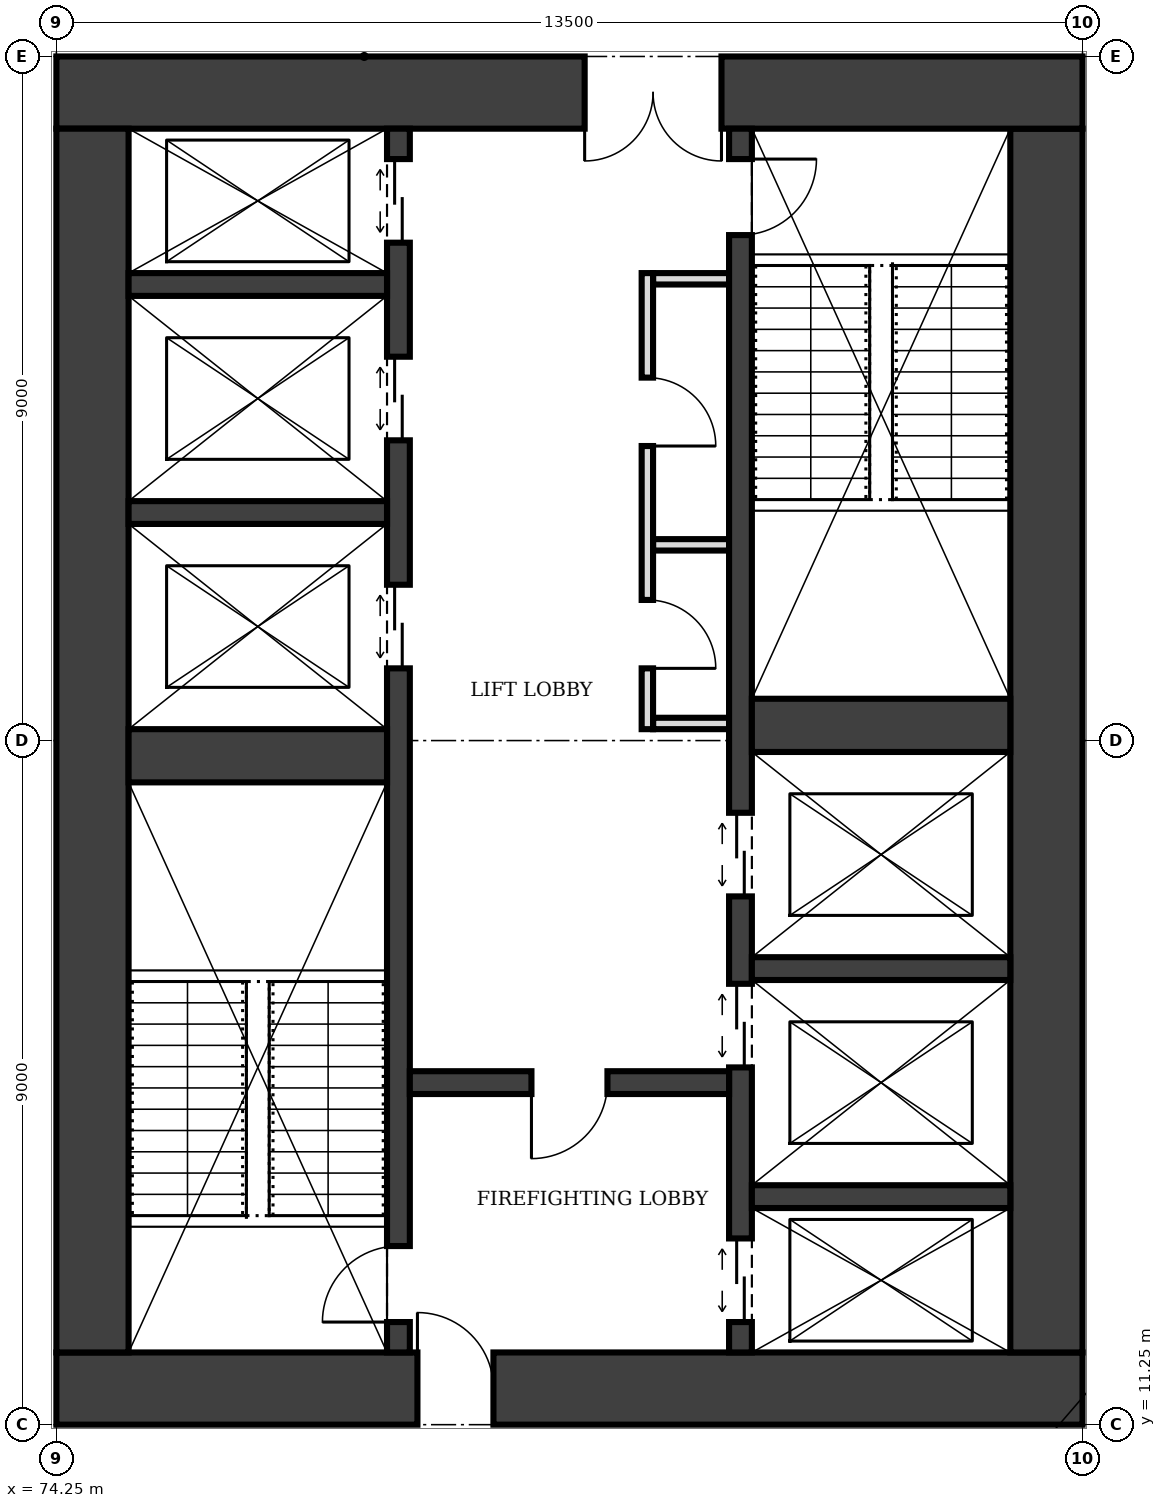
"""IFC4 building model, lengths in metres.
Left out: names, types, materials, properties, quantities, classifications, styles, units other than length and angle.
Written with IfcOpenShell. Run it as: python <this file> out.ifc"""

import sys

from ifc_helpers import new_model, si_unit, direction, frame, frame_2d, origin, place, context, subcontext, project, spatial, rectangle, extrude, element, fill, save


model = new_model("IFC4")
c1 = context("Model", 3, precision=1e-05, world=origin(), true_north=direction((0.0, 1.0)))
c2 = subcontext(c1, "Body", "Model", "MODEL_VIEW")
j1 = project(units=[si_unit("LENGTHUNIT", "METRE"), si_unit("PLANEANGLEUNIT", "RADIAN")], contexts=[c1])
p1 = place(None, origin())
s1 = spatial("IfcSite", under=j1, at=p1, CompositionType="ELEMENT")
p2 = place(p1, origin())
s2 = spatial("IfcBuilding", under=s1, at=p2, CompositionType="ELEMENT")
p3 = place(p2, frame((0.0, 0.0, 105.0)))
s3 = spatial("IfcBuildingStorey", under=s2, at=p3, CompositionType="ELEMENT", Elevation=105.0)
p4 = place(p3, frame((74.25, 11.725, 0.0), z_axis=(0.0, 0.0, 1.0), x_axis=(1.0, 0.0, 0.0)))
e1 = element("IfcWall", 1, at=p4, inside=s3, PredefinedType="SHEAR", context=c2, shape_type="SweptSolid", body=[
    extrude(rectangle(XDim=13.5, YDim=0.95, at=frame_2d((6.75, 0.0))), origin(), (0.0, 0.0, 1.0), 4.0),
])
p5 = place(p4, frame((4.75, 0.0, 0.0)))
e2 = element("IfcOpeningElement", 2, at=p5, cuts=e1, PredefinedType="OPENING", context=c2, shape_type="SweptSolid", body=[
    extrude(rectangle(XDim=1.0, YDim=2.1, at=frame_2d((0.5, 1.05))), frame((0.0, 0.485, 0.0), z_axis=(0.0, -1.0, 0.0), x_axis=(1.0, 0.0, 0.0)), (0.0, 0.0, 1.0), 0.97),
])
p6 = place(p3, frame((87.275, 12.2, 0.0), z_axis=(0.0, 0.0, 1.0), x_axis=(0.0, 1.0, 0.0)))
e3 = element("IfcWall", 3, at=p6, inside=s3, PredefinedType="SHEAR", context=c2, shape_type="SweptSolid", body=[
    extrude(rectangle(XDim=16.1, YDim=0.95, at=frame_2d((8.05, 0.0))), origin(), (0.0, 0.0, 1.0), 4.0),
])
p7 = place(p3, frame((87.75, 28.775, 0.0), z_axis=(0.0, 0.0, 1.0), x_axis=(-1.0, 0.0, 0.0)))
e4 = element("IfcWall", 4, at=p7, inside=s3, PredefinedType="SHEAR", context=c2, shape_type="SweptSolid", body=[
    extrude(rectangle(XDim=13.5, YDim=0.95, at=frame_2d((6.75, 0.0))), origin(), (0.0, 0.0, 1.0), 4.0),
])
p8 = place(p7, frame((4.75, 0.0, 0.0)))
e5 = element("IfcOpeningElement", 5, at=p8, cuts=e4, PredefinedType="OPENING", context=c2, shape_type="SweptSolid", body=[
    extrude(rectangle(XDim=1.8, YDim=2.1, at=frame_2d((0.9, 1.05))), frame((0.0, 0.485, 0.0), z_axis=(0.0, -1.0, 0.0), x_axis=(1.0, 0.0, 0.0)), (0.0, 0.0, 1.0), 0.97),
])
p9 = place(p3, frame((74.725, 28.3, 0.0), z_axis=(0.0, 0.0, 1.0), x_axis=(0.0, -1.0, 0.0)))
e6 = element("IfcWall", 6, at=p9, inside=s3, PredefinedType="SHEAR", context=c2, shape_type="SweptSolid", body=[
    extrude(rectangle(XDim=16.1, YDim=0.95, at=frame_2d((8.05, 0.0))), origin(), (0.0, 0.0, 1.0), 4.0),
])
p10 = place(p3, frame((78.75, 12.2, 0.0), z_axis=(0.0, 0.0, 1.0), x_axis=(0.0, 1.0, 0.0)))
e7 = element("IfcWall", 7, at=p10, inside=s3, PredefinedType="SHEAR", context=c2, shape_type="SweptSolid", body=[
    extrude(rectangle(XDim=16.1, YDim=0.3, at=frame_2d((8.05, 0.0))), origin(), (0.0, 0.0, 1.0), 4.0),
])
p11 = place(p10, frame((0.4, 0.0, 0.0)))
e8 = element("IfcOpeningElement", 8, at=p11, cuts=e7, PredefinedType="OPENING", context=c2, shape_type="SweptSolid", body=[
    extrude(rectangle(XDim=1.0, YDim=2.1, at=frame_2d((0.5, 1.05))), frame((0.0, 0.16, 0.0), z_axis=(0.0, -1.0, 0.0), x_axis=(1.0, 0.0, 0.0)), (0.0, 0.0, 1.0), 0.32),
])
p12 = place(p10, frame((9.0, 0.0, 0.0)))
e9 = element("IfcOpeningElement", 9, at=p12, cuts=e7, PredefinedType="OPENING", context=c2, shape_type="SweptSolid", body=[
    extrude(rectangle(XDim=1.1, YDim=2.1, at=frame_2d((0.55, 1.05))), frame((0.0, 0.16, 0.0), z_axis=(0.0, -1.0, 0.0), x_axis=(1.0, 0.0, 0.0)), (0.0, 0.0, 1.0), 0.32),
])
p13 = place(p10, frame((12.0, 0.0, 0.0)))
e10 = element("IfcOpeningElement", 10, at=p13, cuts=e7, PredefinedType="OPENING", context=c2, shape_type="SweptSolid", body=[
    extrude(rectangle(XDim=1.1, YDim=2.1, at=frame_2d((0.55, 1.05))), frame((0.0, 0.16, 0.0), z_axis=(0.0, -1.0, 0.0), x_axis=(1.0, 0.0, 0.0)), (0.0, 0.0, 1.0), 0.32),
])
p14 = place(p10, frame((14.6, 0.0, 0.0)))
e11 = element("IfcOpeningElement", 11, at=p14, cuts=e7, PredefinedType="OPENING", context=c2, shape_type="SweptSolid", body=[
    extrude(rectangle(XDim=1.1, YDim=2.1, at=frame_2d((0.55, 1.05))), frame((0.0, 0.16, 0.0), z_axis=(0.0, -1.0, 0.0), x_axis=(1.0, 0.0, 0.0)), (0.0, 0.0, 1.0), 0.32),
])
p15 = place(p3, frame((83.25, 12.2, 0.0), z_axis=(0.0, 0.0, 1.0), x_axis=(0.0, 1.0, 0.0)))
e12 = element("IfcWall", 12, at=p15, inside=s3, PredefinedType="SHEAR", context=c2, shape_type="SweptSolid", body=[
    extrude(rectangle(XDim=16.1, YDim=0.3, at=frame_2d((8.05, 0.0))), origin(), (0.0, 0.0, 1.0), 4.0),
])
p16 = place(p15, frame((14.7, 0.0, 0.0)))
e13 = element("IfcOpeningElement", 13, at=p16, cuts=e12, PredefinedType="OPENING", context=c2, shape_type="SweptSolid", body=[
    extrude(rectangle(XDim=1.0, YDim=2.1, at=frame_2d((0.5, 1.05))), frame((0.0, 0.16, 0.0), z_axis=(0.0, -1.0, 0.0), x_axis=(1.0, 0.0, 0.0)), (0.0, 0.0, 1.0), 0.32),
])
p17 = place(p15, frame((0.4, 0.0, 0.0)))
e14 = element("IfcOpeningElement", 14, at=p17, cuts=e12, PredefinedType="OPENING", context=c2, shape_type="SweptSolid", body=[
    extrude(rectangle(XDim=1.1, YDim=2.1, at=frame_2d((0.55, 1.05))), frame((0.0, 0.16, 0.0), z_axis=(0.0, -1.0, 0.0), x_axis=(1.0, 0.0, 0.0)), (0.0, 0.0, 1.0), 0.32),
])
p18 = place(p15, frame((3.75, 0.0, 0.0)))
e15 = element("IfcOpeningElement", 15, at=p18, cuts=e12, PredefinedType="OPENING", context=c2, shape_type="SweptSolid", body=[
    extrude(rectangle(XDim=1.1, YDim=2.1, at=frame_2d((0.55, 1.05))), frame((0.0, 0.16, 0.0), z_axis=(0.0, -1.0, 0.0), x_axis=(1.0, 0.0, 0.0)), (0.0, 0.0, 1.0), 0.32),
])
p19 = place(p15, frame((6.0, 0.0, 0.0)))
e16 = element("IfcOpeningElement", 16, at=p19, cuts=e12, PredefinedType="OPENING", context=c2, shape_type="SweptSolid", body=[
    extrude(rectangle(XDim=1.1, YDim=2.1, at=frame_2d((0.55, 1.05))), frame((0.0, 0.16, 0.0), z_axis=(0.0, -1.0, 0.0), x_axis=(1.0, 0.0, 0.0)), (0.0, 0.0, 1.0), 0.32),
])
p20 = place(p3, frame((75.2, 20.05, 0.0), z_axis=(0.0, 0.0, 1.0), x_axis=(1.0, 0.0, 0.0)))
e17 = element("IfcWall", 17, at=p20, inside=s3, PredefinedType="SHEAR", context=c2, shape_type="SweptSolid", body=[
    extrude(rectangle(XDim=3.4, YDim=0.7, at=frame_2d((1.7, 0.0))), origin(), (0.0, 0.0, 1.0), 4.0),
])
p21 = place(p3, frame((78.9, 15.75, 0.0), z_axis=(0.0, 0.0, 1.0), x_axis=(1.0, 0.0, 0.0)))
e18 = element("IfcWall", 18, at=p21, inside=s3, PredefinedType="SHEAR", context=c2, shape_type="SweptSolid", body=[
    extrude(rectangle(XDim=4.2, YDim=0.3, at=frame_2d((2.1, 0.0))), origin(), (0.0, 0.0, 1.0), 4.0),
])
p22 = place(p21, frame((1.6, 0.0, 0.0)))
e19 = element("IfcOpeningElement", 19, at=p22, cuts=e18, PredefinedType="OPENING", context=c2, shape_type="SweptSolid", body=[
    extrude(rectangle(XDim=1.0, YDim=2.1, at=frame_2d((0.5, 1.05))), frame((0.0, 0.16, 0.0), z_axis=(0.0, -1.0, 0.0), x_axis=(1.0, 0.0, 0.0)), (0.0, 0.0, 1.0), 0.32),
])
for number, where, z_axis, x_axis in (
    (20, (83.4, 14.25, 0.0), (0.0, 0.0, 1.0), (1.0, 0.0, 0.0)),
    (21, (83.4, 17.25, 0.0), (0.0, 0.0, 1.0), (1.0, 0.0, 0.0)),
):
    element("IfcWall", number, at=place(p3, frame(where, z_axis=z_axis, x_axis=x_axis)), inside=s3, PredefinedType="SHEAR", context=c2, shape_type="SweptSolid", body=[
        extrude(rectangle(XDim=3.4, YDim=0.3, at=frame_2d((1.7, 0.0))), origin(), (0.0, 0.0, 1.0), 4.0),
    ])
p23 = place(p3, frame((83.4, 20.45, 0.0), z_axis=(0.0, 0.0, 1.0), x_axis=(1.0, 0.0, 0.0)))
e22 = element("IfcWall", 22, at=p23, inside=s3, PredefinedType="SHEAR", context=c2, shape_type="SweptSolid", body=[
    extrude(rectangle(XDim=3.4, YDim=0.7, at=frame_2d((1.7, 0.0))), origin(), (0.0, 0.0, 1.0), 4.0),
])
for number, where, z_axis, x_axis in (
    (23, (75.2, 23.25, 0.0), (0.0, 0.0, 1.0), (1.0, 0.0, 0.0)),
    (24, (75.2, 26.25, 0.0), (0.0, 0.0, 1.0), (1.0, 0.0, 0.0)),
):
    element("IfcWall", number, at=place(p3, frame(where, z_axis=z_axis, x_axis=x_axis)), inside=s3, PredefinedType="SHEAR", context=c2, shape_type="SweptSolid", body=[
        extrude(rectangle(XDim=3.4, YDim=0.3, at=frame_2d((1.7, 0.0))), origin(), (0.0, 0.0, 1.0), 4.0),
    ])
p24 = place(p3, frame((82.025, 20.4, 0.0), z_axis=(0.0, 0.0, 1.0), x_axis=(0.0, 1.0, 0.0)))
e25 = element("IfcWall", 25, at=p24, inside=s3, PredefinedType="PARTITIONING", context=c2, shape_type="SweptSolid", body=[
    extrude(rectangle(XDim=6.0, YDim=0.15, at=frame_2d((3.0, 0.0))), origin(), (0.0, 0.0, 1.0), 3.75),
])
p25 = place(p24, frame((0.8, 0.0, 0.0)))
e26 = element("IfcOpeningElement", 26, at=p25, cuts=e25, PredefinedType="OPENING", context=c2, shape_type="SweptSolid", body=[
    extrude(rectangle(XDim=0.9, YDim=2.1, at=frame_2d((0.45, 1.05))), frame((0.0, 0.085, 0.0), z_axis=(0.0, -1.0, 0.0), x_axis=(1.0, 0.0, 0.0)), (0.0, 0.0, 1.0), 0.17),
])
p26 = place(p24, frame((3.725, 0.0, 0.0)))
e27 = element("IfcOpeningElement", 27, at=p26, cuts=e25, PredefinedType="OPENING", context=c2, shape_type="SweptSolid", body=[
    extrude(rectangle(XDim=0.9, YDim=2.1, at=frame_2d((0.45, 1.05))), frame((0.0, 0.085, 0.0), z_axis=(0.0, -1.0, 0.0), x_axis=(1.0, 0.0, 0.0)), (0.0, 0.0, 1.0), 0.17),
])
for number, where, z_axis, x_axis in (
    (28, (82.1, 20.475, 0.0), (0.0, 0.0, 1.0), (1.0, 0.0, 0.0)),
    (29, (82.1, 22.825, 0.0), (0.0, 0.0, 1.0), (1.0, 0.0, 0.0)),
    (30, (82.1, 26.325, 0.0), (0.0, 0.0, 1.0), (1.0, 0.0, 0.0)),
):
    element("IfcWall", number, at=place(p3, frame(where, z_axis=z_axis, x_axis=x_axis)), inside=s3, PredefinedType="PARTITIONING", context=c2, shape_type="SweptSolid", body=[
        extrude(rectangle(XDim=1.0, YDim=0.15, at=frame_2d((0.5, 0.0))), origin(), (0.0, 0.0, 1.0), 3.75),
    ])
p27 = place(p5, origin())
e31 = element("IfcDoor", 31, at=p27, inside=s3, OperationType="SINGLE_SWING_LEFT", PredefinedType="DOOR", context=c2, shape_type="SweptSolid", body=[
    extrude(rectangle(XDim=1.0, YDim=2.1, at=frame_2d((0.5, 1.05))), frame((0.0, 0.025, 0.0), z_axis=(0.0, -1.0, 0.0), x_axis=(1.0, 0.0, 0.0)), (0.0, 0.0, 1.0), 0.05),
])
fill(e2, e31)
p28 = place(p8, origin())
e32 = element("IfcDoor", 32, at=p28, inside=s3, OperationType="DOUBLE_DOOR_SINGLE_SWING", PredefinedType="DOOR", context=c2, shape_type="SweptSolid", body=[
    extrude(rectangle(XDim=1.8, YDim=2.1, at=frame_2d((0.9, 1.05))), frame((0.0, 0.025, 0.0), z_axis=(0.0, -1.0, 0.0), x_axis=(1.0, 0.0, 0.0)), (0.0, 0.0, 1.0), 0.05),
])
fill(e5, e32)
p29 = place(p22, frame((1.0, 0.0, 0.0), z_axis=(0.0, 0.0, 1.0), x_axis=(-1.0, 0.0, 0.0)))
e33 = element("IfcDoor", 33, at=p29, inside=s3, OperationType="SINGLE_SWING_RIGHT", PredefinedType="DOOR", context=c2, shape_type="SweptSolid", body=[
    extrude(rectangle(XDim=1.0, YDim=2.1, at=frame_2d((0.5, 1.05))), frame((0.0, 0.025, 0.0), z_axis=(0.0, -1.0, 0.0), x_axis=(1.0, 0.0, 0.0)), (0.0, 0.0, 1.0), 0.05),
])
fill(e19, e33)
p30 = place(p11, origin())
e34 = element("IfcDoor", 34, at=p30, inside=s3, OperationType="SINGLE_SWING_LEFT", PredefinedType="DOOR", context=c2, shape_type="SweptSolid", body=[
    extrude(rectangle(XDim=1.0, YDim=2.1, at=frame_2d((0.5, 1.05))), frame((0.0, 0.025, 0.0), z_axis=(0.0, -1.0, 0.0), x_axis=(1.0, 0.0, 0.0)), (0.0, 0.0, 1.0), 0.05),
])
fill(e8, e34)
p31 = place(p16, frame((1.0, 0.0, 0.0), z_axis=(0.0, 0.0, 1.0), x_axis=(-1.0, 0.0, 0.0)))
e35 = element("IfcDoor", 35, at=p31, inside=s3, OperationType="SINGLE_SWING_LEFT", PredefinedType="DOOR", context=c2, shape_type="SweptSolid", body=[
    extrude(rectangle(XDim=1.0, YDim=2.1, at=frame_2d((0.5, 1.05))), frame((0.0, 0.025, 0.0), z_axis=(0.0, -1.0, 0.0), x_axis=(1.0, 0.0, 0.0)), (0.0, 0.0, 1.0), 0.05),
])
fill(e13, e35)
p32 = place(p17, origin())
e36 = element("IfcDoor", 36, at=p32, inside=s3, OperationType="DOUBLE_DOOR_SLIDING", PredefinedType="DOOR", context=c2, shape_type="SweptSolid", body=[
    extrude(rectangle(XDim=1.1, YDim=2.1, at=frame_2d((0.55, 1.05))), frame((0.0, 0.025, 0.0), z_axis=(0.0, -1.0, 0.0), x_axis=(1.0, 0.0, 0.0)), (0.0, 0.0, 1.0), 0.05),
])
fill(e14, e36)
p33 = place(p12, origin())
e37 = element("IfcDoor", 37, at=p33, inside=s3, OperationType="DOUBLE_DOOR_SLIDING", PredefinedType="DOOR", context=c2, shape_type="SweptSolid", body=[
    extrude(rectangle(XDim=1.1, YDim=2.1, at=frame_2d((0.55, 1.05))), frame((0.0, 0.025, 0.0), z_axis=(0.0, -1.0, 0.0), x_axis=(1.0, 0.0, 0.0)), (0.0, 0.0, 1.0), 0.05),
])
fill(e9, e37)
p34 = place(p13, origin())
e38 = element("IfcDoor", 38, at=p34, inside=s3, OperationType="DOUBLE_DOOR_SLIDING", PredefinedType="DOOR", context=c2, shape_type="SweptSolid", body=[
    extrude(rectangle(XDim=1.1, YDim=2.1, at=frame_2d((0.55, 1.05))), frame((0.0, 0.025, 0.0), z_axis=(0.0, -1.0, 0.0), x_axis=(1.0, 0.0, 0.0)), (0.0, 0.0, 1.0), 0.05),
])
fill(e10, e38)
p35 = place(p14, origin())
e39 = element("IfcDoor", 39, at=p35, inside=s3, OperationType="DOUBLE_DOOR_SLIDING", PredefinedType="DOOR", context=c2, shape_type="SweptSolid", body=[
    extrude(rectangle(XDim=1.1, YDim=2.1, at=frame_2d((0.55, 1.05))), frame((0.0, 0.025, 0.0), z_axis=(0.0, -1.0, 0.0), x_axis=(1.0, 0.0, 0.0)), (0.0, 0.0, 1.0), 0.05),
])
fill(e11, e39)
p36 = place(p18, origin())
e40 = element("IfcDoor", 40, at=p36, inside=s3, OperationType="DOUBLE_DOOR_SLIDING", PredefinedType="DOOR", context=c2, shape_type="SweptSolid", body=[
    extrude(rectangle(XDim=1.1, YDim=2.1, at=frame_2d((0.55, 1.05))), frame((0.0, 0.025, 0.0), z_axis=(0.0, -1.0, 0.0), x_axis=(1.0, 0.0, 0.0)), (0.0, 0.0, 1.0), 0.05),
])
fill(e15, e40)
p37 = place(p19, origin())
e41 = element("IfcDoor", 41, at=p37, inside=s3, OperationType="DOUBLE_DOOR_SLIDING", PredefinedType="DOOR", context=c2, shape_type="SweptSolid", body=[
    extrude(rectangle(XDim=1.1, YDim=2.1, at=frame_2d((0.55, 1.05))), frame((0.0, 0.025, 0.0), z_axis=(0.0, -1.0, 0.0), x_axis=(1.0, 0.0, 0.0)), (0.0, 0.0, 1.0), 0.05),
])
fill(e16, e41)
p38 = place(p25, frame((0.9, 0.0, 0.0), z_axis=(0.0, 0.0, 1.0), x_axis=(-1.0, 0.0, 0.0)))
e42 = element("IfcDoor", 42, at=p38, inside=s3, OperationType="SINGLE_SWING_RIGHT", PredefinedType="DOOR", context=c2, shape_type="SweptSolid", body=[
    extrude(rectangle(XDim=0.9, YDim=2.1, at=frame_2d((0.45, 1.05))), frame((0.0, 0.025, 0.0), z_axis=(0.0, -1.0, 0.0), x_axis=(1.0, 0.0, 0.0)), (0.0, 0.0, 1.0), 0.05),
])
fill(e26, e42)
p39 = place(p26, frame((0.9, 0.0, 0.0), z_axis=(0.0, 0.0, 1.0), x_axis=(-1.0, 0.0, 0.0)))
e43 = element("IfcDoor", 43, at=p39, inside=s3, OperationType="SINGLE_SWING_RIGHT", PredefinedType="DOOR", context=c2, shape_type="SweptSolid", body=[
    extrude(rectangle(XDim=0.9, YDim=2.1, at=frame_2d((0.45, 1.05))), frame((0.0, 0.025, 0.0), z_axis=(0.0, -1.0, 0.0), x_axis=(1.0, 0.0, 0.0)), (0.0, 0.0, 1.0), 0.05),
])
fill(e27, e43)
save(model, sys.argv[1])
